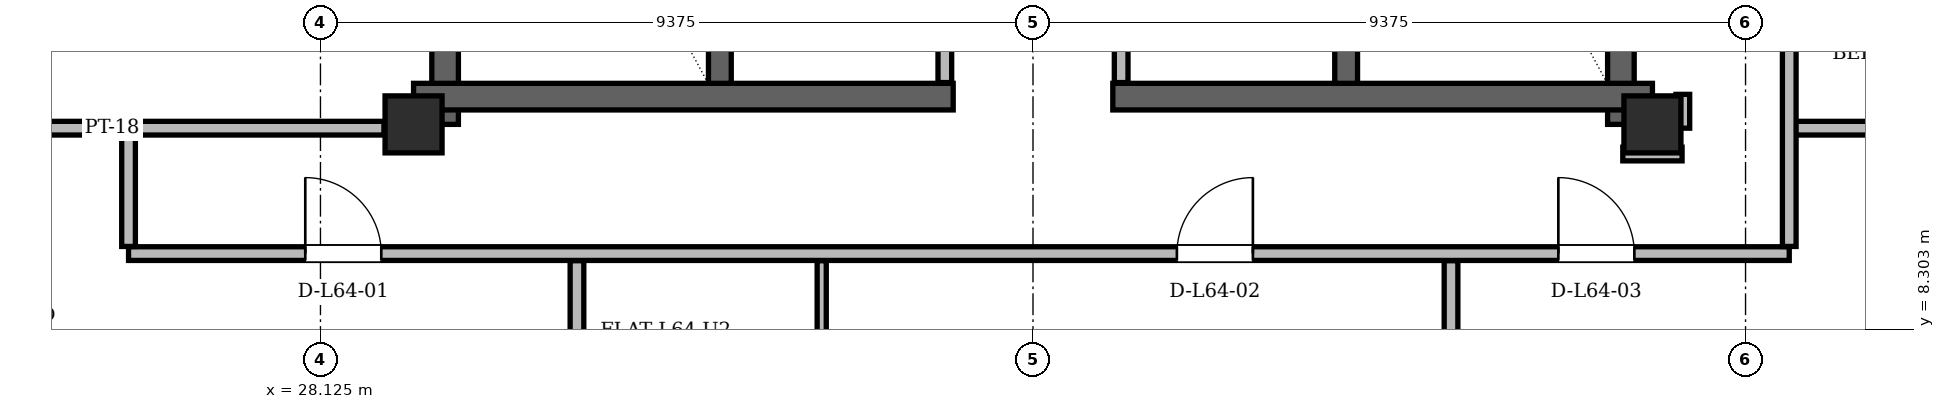
"""IFC4 building model, lengths in metres.
Left out: names, types, materials, properties, quantities, classifications, styles, units other than length and angle.
Written with IfcOpenShell. Run it as: python <this file> out.ifc"""

import sys

from ifc_helpers import new_model, si_unit, direction, frame, frame_2d, origin, origin_2d, place, context, subcontext, project, spatial, rectangle, hollow_rectangle, extrude, element, fill, save


model = new_model("IFC4")
c1 = context("Model", 3, precision=1e-05, world=origin(), true_north=direction((0.0, 1.0)))
c2 = subcontext(c1, "Body", "Model", "MODEL_VIEW")
j1 = project(units=[si_unit("LENGTHUNIT", "METRE"), si_unit("PLANEANGLEUNIT", "RADIAN")], contexts=[c1])
p1 = place(None, origin())
s1 = spatial("IfcSite", under=j1, at=p1, CompositionType="ELEMENT")
p2 = place(p1, origin())
s2 = spatial("IfcBuilding", under=s1, at=p2, CompositionType="ELEMENT")
p3 = place(p2, frame((0.0, 0.0, 241.5)))
s3 = spatial("IfcBuildingStorey", under=s2, at=p3, CompositionType="ELEMENT", Elevation=241.5)
for number, where, z_axis, x_axis in (
    (1, (29.35, 11.0, 0.0), (0.0, 0.0, 1.0), (1.0, 0.0, 0.0)),
    (2, (45.65, 11.0, 0.0), (0.0, 0.0, 1.0), (1.0, 0.0, 0.0)),
):
    element("IfcColumn", number, at=place(p3, frame(where, z_axis=z_axis, x_axis=x_axis)), inside=s3, PredefinedType="COLUMN", context=c2, shape_type="SweptSolid", body=[
        extrude(hollow_rectangle(XDim=0.75, YDim=0.75, WallThickness=0.06, at=origin_2d()), origin(), (0.0, 0.0, 1.0), 3.6),
    ])
for number, where, z_axis, x_axis in (
    (3, (29.765, 11.0, 0.0), (0.0, 0.0, 1.0), (0.0, 1.0, 0.0)),
    (4, (45.235, 11.0, 0.0), (0.0, 0.0, 1.0), (0.0, 1.0, 0.0)),
):
    element("IfcWall", number, at=place(p3, frame(where, z_axis=z_axis, x_axis=x_axis)), inside=s3, PredefinedType="SHEAR", context=c2, shape_type="SweptSolid", body=[
        extrude(rectangle(XDim=13.3, YDim=0.35, at=frame_2d((6.65, 0.0))), origin(), (0.0, 0.0, 1.0), 3.34),
    ])
for number, where, z_axis, x_axis in (
    (5, (29.35, 11.365, 0.0), (0.0, 0.0, 1.0), (1.0, 0.0, 0.0)),
    (6, (38.55, 11.365, 0.0), (0.0, 0.0, 1.0), (1.0, 0.0, 0.0)),
):
    element("IfcWall", number, at=place(p3, frame(where, z_axis=z_axis, x_axis=x_axis)), inside=s3, PredefinedType="SHEAR", context=c2, shape_type="SweptSolid", body=[
        extrude(rectangle(XDim=7.1, YDim=0.35, at=frame_2d((3.55, 0.0))), origin(), (0.0, 0.0, 1.0), 3.34),
    ])
for number, where, z_axis, x_axis in (
    (7, (33.38, 11.54, 0.0), (0.0, 0.0, 1.0), (0.0, 1.0, 0.0)),
    (8, (41.62, 11.54, 0.0), (0.0, 0.0, 1.0), (0.0, 1.0, 0.0)),
):
    element("IfcWall", number, at=place(p3, frame(where, z_axis=z_axis, x_axis=x_axis)), inside=s3, PredefinedType="SHEAR", context=c2, shape_type="SweptSolid", body=[
        extrude(rectangle(XDim=7.62, YDim=0.3, at=frame_2d((3.81, 0.0))), origin(), (0.0, 0.0, 1.0), 3.34),
    ])
p4 = place(p3, frame((58.857, 11.097, 0.0), z_axis=(0.0, 0.0, 1.0), x_axis=(-0.499999075663, 0.86602593745, 0.0)))
e9 = element("IfcWall", 9, at=p4, inside=s3, PredefinedType="SOLIDWALL", context=c2, shape_type="SweptSolid", body=[
    extrude(rectangle(XDim=36.951, YDim=0.29, at=frame_2d((18.476, 0.0))), origin(), (0.0, 0.0, 1.0), 2.637),
])
p5 = place(p4, frame((7.615, 0.0, 0.0)))
e10 = element("IfcOpeningElement", 10, at=p5, cuts=e9, PredefinedType="OPENING", context=c2, shape_type="SweptSolid", body=[
    extrude(rectangle(XDim=1.5, YDim=2.2, at=frame_2d((0.75, 1.1))), frame((0.0, 0.145, 0.0), z_axis=(0.0, -1.0, 0.0), x_axis=(1.0, 0.0, 0.0)), (0.0, 0.0, 1.0), 0.29),
])
p6 = place(p4, frame((28.662, 0.0, 0.0)))
e11 = element("IfcOpeningElement", 11, at=p6, cuts=e9, PredefinedType="OPENING", context=c2, shape_type="SweptSolid", body=[
    extrude(rectangle(XDim=1.5, YDim=2.2, at=frame_2d((0.75, 1.1))), frame((0.0, 0.145, 0.0), z_axis=(0.0, -1.0, 0.0), x_axis=(1.0, 0.0, 0.0)), (0.0, 0.0, 1.0), 0.29),
])
p7 = place(p4, frame((3.768, 0.0, 0.85)))
e12 = element("IfcOpeningElement", 12, at=p7, cuts=e9, PredefinedType="OPENING", context=c2, shape_type="SweptSolid", body=[
    extrude(rectangle(XDim=1.2, YDim=1.48, at=frame_2d((0.6, 0.74))), frame((0.0, 0.145, 0.0), z_axis=(0.0, -1.0, 0.0), x_axis=(1.0, 0.0, 0.0)), (0.0, 0.0, 1.0), 0.29),
])
p8 = place(p4, frame((1.122, 0.0, 0.85)))
e13 = element("IfcOpeningElement", 13, at=p8, cuts=e9, PredefinedType="OPENING", context=c2, shape_type="SweptSolid", body=[
    extrude(rectangle(XDim=1.6, YDim=1.677, at=frame_2d((0.8, 0.838))), frame((0.0, 0.145, 0.0), z_axis=(0.0, -1.0, 0.0), x_axis=(1.0, 0.0, 0.0)), (0.0, 0.0, 1.0), 0.29),
])
p9 = place(p4, frame((34.681, 0.0, 0.85)))
e14 = element("IfcOpeningElement", 14, at=p9, cuts=e9, PredefinedType="OPENING", context=c2, shape_type="SweptSolid", body=[
    extrude(rectangle(XDim=1.2, YDim=1.48, at=frame_2d((0.6, 0.74))), frame((0.0, 0.145, 0.0), z_axis=(0.0, -1.0, 0.0), x_axis=(1.0, 0.0, 0.0)), (0.0, 0.0, 1.0), 0.29),
])
p10 = place(p4, frame((16.81, 0.0, 0.85)))
e15 = element("IfcOpeningElement", 15, at=p10, cuts=e9, PredefinedType="OPENING", context=c2, shape_type="SweptSolid", body=[
    extrude(rectangle(XDim=2.2, YDim=1.677, at=frame_2d((1.1, 0.838))), frame((0.0, 0.145, 0.0), z_axis=(0.0, -1.0, 0.0), x_axis=(1.0, 0.0, 0.0)), (0.0, 0.0, 1.0), 0.29),
])
p11 = place(p4, frame((22.803, 0.0, 0.85)))
e16 = element("IfcOpeningElement", 16, at=p11, cuts=e9, PredefinedType="OPENING", context=c2, shape_type="SweptSolid", body=[
    extrude(rectangle(XDim=1.6, YDim=1.677, at=frame_2d((0.8, 0.838))), frame((0.0, 0.145, 0.0), z_axis=(0.0, -1.0, 0.0), x_axis=(1.0, 0.0, 0.0)), (0.0, 0.0, 1.0), 0.29),
])
p12 = place(p4, frame((9.478, 0.0, 0.85)))
e17 = element("IfcOpeningElement", 17, at=p12, cuts=e9, PredefinedType="OPENING", context=c2, shape_type="SweptSolid", body=[
    extrude(rectangle(XDim=1.2, YDim=1.48, at=frame_2d((0.6, 0.74))), frame((0.0, 0.145, 0.0), z_axis=(0.0, -1.0, 0.0), x_axis=(1.0, 0.0, 0.0)), (0.0, 0.0, 1.0), 0.29),
])
p13 = place(p3, frame((34.618, 43.098, 0.0), z_axis=(0.0, 0.0, 1.0), x_axis=(-0.499999075663, -0.86602593745, 0.0)))
e18 = element("IfcWall", 18, at=p13, inside=s3, PredefinedType="SOLIDWALL", context=c2, shape_type="SweptSolid", body=[
    extrude(rectangle(XDim=36.951, YDim=0.29, at=frame_2d((18.476, 0.0))), origin(), (0.0, 0.0, 1.0), 2.637),
])
p14 = place(p13, frame((8.244, 0.0, 0.0)))
e19 = element("IfcOpeningElement", 19, at=p14, cuts=e18, PredefinedType="OPENING", context=c2, shape_type="SweptSolid", body=[
    extrude(rectangle(XDim=1.5, YDim=2.2, at=frame_2d((0.75, 1.1))), frame((0.0, 0.145, 0.0), z_axis=(0.0, -1.0, 0.0), x_axis=(1.0, 0.0, 0.0)), (0.0, 0.0, 1.0), 0.29),
])
p15 = place(p13, frame((32.022, 0.0, 0.0)))
e20 = element("IfcOpeningElement", 20, at=p15, cuts=e18, PredefinedType="OPENING", context=c2, shape_type="SweptSolid", body=[
    extrude(rectangle(XDim=1.5, YDim=2.2, at=frame_2d((0.75, 1.1))), frame((0.0, 0.145, 0.0), z_axis=(0.0, -1.0, 0.0), x_axis=(1.0, 0.0, 0.0)), (0.0, 0.0, 1.0), 0.29),
])
p16 = place(p13, frame((21.911, 0.0, 0.85)))
e21 = element("IfcOpeningElement", 21, at=p16, cuts=e18, PredefinedType="OPENING", context=c2, shape_type="SweptSolid", body=[
    extrude(rectangle(XDim=2.4, YDim=1.677, at=frame_2d((1.2, 0.838))), frame((0.0, 0.145, 0.0), z_axis=(0.0, -1.0, 0.0), x_axis=(1.0, 0.0, 0.0)), (0.0, 0.0, 1.0), 0.29),
])
p17 = place(p13, frame((28.29, 0.0, 0.85)))
e22 = element("IfcOpeningElement", 22, at=p17, cuts=e18, PredefinedType="OPENING", context=c2, shape_type="SweptSolid", body=[
    extrude(rectangle(XDim=1.2, YDim=1.48, at=frame_2d((0.6, 0.74))), frame((0.0, 0.145, 0.0), z_axis=(0.0, -1.0, 0.0), x_axis=(1.0, 0.0, 0.0)), (0.0, 0.0, 1.0), 0.29),
])
p18 = place(p13, frame((34.755, 0.0, 0.85)))
e23 = element("IfcOpeningElement", 23, at=p18, cuts=e18, PredefinedType="OPENING", context=c2, shape_type="SweptSolid", body=[
    extrude(rectangle(XDim=1.2, YDim=1.48, at=frame_2d((0.6, 0.74))), frame((0.0, 0.145, 0.0), z_axis=(0.0, -1.0, 0.0), x_axis=(1.0, 0.0, 0.0)), (0.0, 0.0, 1.0), 0.29),
])
p19 = place(p13, frame((12.233, 0.0, 0.85)))
e24 = element("IfcOpeningElement", 24, at=p19, cuts=e18, PredefinedType="OPENING", context=c2, shape_type="SweptSolid", body=[
    extrude(rectangle(XDim=1.2, YDim=1.48, at=frame_2d((0.6, 0.74))), frame((0.0, 0.145, 0.0), z_axis=(0.0, -1.0, 0.0), x_axis=(1.0, 0.0, 0.0)), (0.0, 0.0, 1.0), 0.29),
])
p20 = place(p13, frame((16.59, 0.0, 0.85)))
e25 = element("IfcOpeningElement", 25, at=p20, cuts=e18, PredefinedType="OPENING", context=c2, shape_type="SweptSolid", body=[
    extrude(rectangle(XDim=2.0, YDim=1.677, at=frame_2d((1.0, 0.838))), frame((0.0, 0.145, 0.0), z_axis=(0.0, -1.0, 0.0), x_axis=(1.0, 0.0, 0.0)), (0.0, 0.0, 1.0), 0.29),
])
p21 = place(p13, frame((3.092, 0.0, 0.85)))
e26 = element("IfcOpeningElement", 26, at=p21, cuts=e18, PredefinedType="OPENING", context=c2, shape_type="SweptSolid", body=[
    extrude(rectangle(XDim=1.2, YDim=1.48, at=frame_2d((0.6, 0.74))), frame((0.0, 0.145, 0.0), z_axis=(0.0, -1.0, 0.0), x_axis=(1.0, 0.0, 0.0)), (0.0, 0.0, 1.0), 0.29),
])
p22 = place(p3, frame((36.34, 11.55, 0.0), z_axis=(0.0, 0.0, 1.0), x_axis=(0.0, 1.0, 0.0)))
e27 = element("IfcWall", 27, at=p22, inside=s3, PredefinedType="PARTITIONING", context=c2, shape_type="SweptSolid", body=[
    extrude(rectangle(XDim=5.55, YDim=0.18, at=frame_2d((2.775, 0.0))), origin(), (0.0, 0.0, 1.0), 3.34),
])
p23 = place(p22, frame((0.55, 0.0, 0.0)))
e28 = element("IfcOpeningElement", 28, at=p23, cuts=e27, PredefinedType="OPENING", context=c2, shape_type="SweptSolid", body=[
    extrude(rectangle(XDim=0.88, YDim=2.08, at=frame_2d((0.44, 1.04))), frame((0.0, 0.09, 0.0), z_axis=(0.0, -1.0, 0.0), x_axis=(1.0, 0.0, 0.0)), (0.0, 0.0, 1.0), 0.18),
])
p24 = place(p22, frame((3.25, 0.0, 0.0)))
e29 = element("IfcOpeningElement", 29, at=p24, cuts=e27, PredefinedType="OPENING", context=c2, shape_type="SweptSolid", body=[
    extrude(rectangle(XDim=0.88, YDim=2.08, at=frame_2d((0.44, 1.04))), frame((0.0, 0.09, 0.0), z_axis=(0.0, -1.0, 0.0), x_axis=(1.0, 0.0, 0.0)), (0.0, 0.0, 1.0), 0.18),
])
p25 = place(p3, frame((38.66, 11.55, 0.0), z_axis=(0.0, 0.0, 1.0), x_axis=(0.0, 1.0, 0.0)))
e30 = element("IfcWall", 30, at=p25, inside=s3, PredefinedType="PARTITIONING", context=c2, shape_type="SweptSolid", body=[
    extrude(rectangle(XDim=5.55, YDim=0.18, at=frame_2d((2.775, 0.0))), origin(), (0.0, 0.0, 1.0), 3.34),
])
p26 = place(p25, frame((1.35, 0.0, 0.0)))
e31 = element("IfcOpeningElement", 31, at=p26, cuts=e30, PredefinedType="OPENING", context=c2, shape_type="SweptSolid", body=[
    extrude(rectangle(XDim=0.88, YDim=2.08, at=frame_2d((0.44, 1.04))), frame((0.0, 0.09, 0.0), z_axis=(0.0, -1.0, 0.0), x_axis=(1.0, 0.0, 0.0)), (0.0, 0.0, 1.0), 0.18),
])
p27 = place(p25, frame((4.1, 0.0, 0.0)))
e32 = element("IfcOpeningElement", 32, at=p27, cuts=e30, PredefinedType="OPENING", context=c2, shape_type="SweptSolid", body=[
    extrude(rectangle(XDim=0.88, YDim=2.08, at=frame_2d((0.44, 1.04))), frame((0.0, 0.09, 0.0), z_axis=(0.0, -1.0, 0.0), x_axis=(1.0, 0.0, 0.0)), (0.0, 0.0, 1.0), 0.18),
])
p28 = place(p3, frame((25.6, 9.3, 0.0), z_axis=(0.0, 0.0, 1.0), x_axis=(1.0, 0.0, 0.0)))
e33 = element("IfcWall", 33, at=p28, inside=s3, PredefinedType="PARTITIONING", context=c2, shape_type="SweptSolid", body=[
    extrude(rectangle(XDim=21.85, YDim=0.18, at=frame_2d((10.925, 0.0))), origin(), (0.0, 0.0, 1.0), 2.873),
])
p29 = place(p28, frame((2.325, 0.0, 0.0)))
e34 = element("IfcOpeningElement", 34, at=p29, cuts=e33, PredefinedType="OPENING", context=c2, shape_type="SweptSolid", body=[
    extrude(rectangle(XDim=1.0, YDim=2.18, at=frame_2d((0.5, 1.09))), frame((0.0, 0.09, 0.0), z_axis=(0.0, -1.0, 0.0), x_axis=(1.0, 0.0, 0.0)), (0.0, 0.0, 1.0), 0.18),
])
p30 = place(p28, frame((13.793, 0.0, 0.0)))
e35 = element("IfcOpeningElement", 35, at=p30, cuts=e33, PredefinedType="OPENING", context=c2, shape_type="SweptSolid", body=[
    extrude(rectangle(XDim=1.0, YDim=2.18, at=frame_2d((0.5, 1.09))), frame((0.0, 0.09, 0.0), z_axis=(0.0, -1.0, 0.0), x_axis=(1.0, 0.0, 0.0)), (0.0, 0.0, 1.0), 0.18),
])
p31 = place(p28, frame((18.812, 0.0, 0.0)))
e36 = element("IfcOpeningElement", 36, at=p31, cuts=e33, PredefinedType="OPENING", context=c2, shape_type="SweptSolid", body=[
    extrude(rectangle(XDim=1.0, YDim=2.18, at=frame_2d((0.5, 1.09))), frame((0.0, 0.09, 0.0), z_axis=(0.0, -1.0, 0.0), x_axis=(1.0, 0.0, 0.0)), (0.0, 0.0, 1.0), 0.18),
])
p32 = place(p3, frame((45.26, 10.61, 0.0), z_axis=(0.0, 0.0, 1.0), x_axis=(1.0, 0.0, 0.0)))
e37 = element("IfcWall", 37, at=p32, inside=s3, PredefinedType="PARTITIONING", context=c2, shape_type="SweptSolid", body=[
    extrude(rectangle(XDim=0.78, YDim=0.18, at=frame_2d((0.39, 0.0))), origin(), (0.0, 0.0, 1.0), 3.34),
])
p33 = place(p3, frame((16.528, 10.95, 0.0), z_axis=(0.0, 0.0, 1.0), x_axis=(1.0, 0.0, 0.0)))
e38 = element("IfcWall", 38, at=p33, inside=s3, PredefinedType="PARTITIONING", context=c2, shape_type="SweptSolid", body=[
    extrude(rectangle(XDim=12.432, YDim=0.18, at=frame_2d((6.216, 0.0))), origin(), (0.0, 0.0, 1.0), 2.873),
])
p34 = place(p3, frame((47.45, 10.95, 0.0), z_axis=(0.0, 0.0, 1.0), x_axis=(1.0, 0.0, 0.0)))
e39 = element("IfcWall", 39, at=p34, inside=s3, PredefinedType="PARTITIONING", context=c2, shape_type="SweptSolid", body=[
    extrude(rectangle(XDim=11.022, YDim=0.18, at=frame_2d((5.511, 0.0))), origin(), (0.0, 0.0, 1.0), 2.873),
])
p35 = place(p3, frame((25.6, 9.394, 0.0), z_axis=(0.0, 0.0, 1.0), x_axis=(0.0, 1.0, 0.0)))
e40 = element("IfcWall", 40, at=p35, inside=s3, PredefinedType="PARTITIONING", context=c2, shape_type="SweptSolid", body=[
    extrude(rectangle(XDim=1.462, YDim=0.18, at=frame_2d((0.731, 0.0))), origin(), (0.0, 0.0, 1.0), 3.34),
])
p36 = place(p3, frame((31.5, 6.254, 0.0), z_axis=(0.0, 0.0, 1.0), x_axis=(0.0, 1.0, 0.0)))
e41 = element("IfcWall", 41, at=p36, inside=s3, PredefinedType="PARTITIONING", context=c2, shape_type="SweptSolid", body=[
    extrude(rectangle(XDim=2.952, YDim=0.18, at=frame_2d((1.476, 0.0))), origin(), (0.0, 0.0, 1.0), 2.926),
])
p37 = place(p3, frame((34.72, 6.254, 0.0), z_axis=(0.0, 0.0, 1.0), x_axis=(0.0, 1.0, 0.0)))
e42 = element("IfcWall", 42, at=p37, inside=s3, PredefinedType="PARTITIONING", context=c2, shape_type="SweptSolid", body=[
    extrude(rectangle(XDim=2.952, YDim=0.12, at=frame_2d((1.476, 0.0))), origin(), (0.0, 0.0, 1.0), 3.34),
])
p38 = place(p37, frame((1.083, 0.0, 0.0)))
e43 = element("IfcOpeningElement", 43, at=p38, cuts=e42, PredefinedType="OPENING", context=c2, shape_type="SweptSolid", body=[
    extrude(rectangle(XDim=0.88, YDim=2.08, at=frame_2d((0.44, 1.04))), frame((0.0, 0.06, 0.0), z_axis=(0.0, -1.0, 0.0), x_axis=(1.0, 0.0, 0.0)), (0.0, 0.0, 1.0), 0.12),
])
p39 = place(p3, frame((43.0, 6.254, 0.0), z_axis=(0.0, 0.0, 1.0), x_axis=(0.0, 1.0, 0.0)))
e44 = element("IfcWall", 44, at=p39, inside=s3, PredefinedType="PARTITIONING", context=c2, shape_type="SweptSolid", body=[
    extrude(rectangle(XDim=2.952, YDim=0.18, at=frame_2d((1.476, 0.0))), origin(), (0.0, 0.0, 1.0), 3.34),
])
p40 = place(p3, frame((46.05, 10.95, 0.0), z_axis=(0.0, 0.0, 1.0), x_axis=(0.0, 1.0, 0.0)))
e45 = element("IfcWall", 45, at=p40, inside=s3, PredefinedType="PARTITIONING", context=c2, shape_type="SweptSolid", body=[
    extrude(rectangle(XDim=0.445, YDim=0.18, at=frame_2d((0.223, 0.0))), origin(), (0.0, 0.0, 1.0), 2.873),
])
p41 = place(p3, frame((47.45, 9.394, 0.0), z_axis=(0.0, 0.0, 1.0), x_axis=(0.0, 1.0, 0.0)))
e46 = element("IfcWall", 46, at=p41, inside=s3, PredefinedType="PARTITIONING", context=c2, shape_type="SweptSolid", body=[
    extrude(rectangle(XDim=16.482, YDim=0.18, at=frame_2d((8.241, 0.0))), origin(), (0.0, 0.0, 1.0), 2.873),
])
p42 = place(p41, frame((6.247, 0.0, 0.0)))
e47 = element("IfcOpeningElement", 47, at=p42, cuts=e46, PredefinedType="OPENING", context=c2, shape_type="SweptSolid", body=[
    extrude(rectangle(XDim=1.0, YDim=2.18, at=frame_2d((0.5, 1.09))), frame((0.0, 0.09, 0.0), z_axis=(0.0, -1.0, 0.0), x_axis=(1.0, 0.0, 0.0)), (0.0, 0.0, 1.0), 0.18),
])
p43 = place(p41, frame((10.379, 0.0, 0.0)))
e48 = element("IfcOpeningElement", 48, at=p43, cuts=e46, PredefinedType="OPENING", context=c2, shape_type="SweptSolid", body=[
    extrude(rectangle(XDim=1.0, YDim=2.18, at=frame_2d((0.5, 1.09))), frame((0.0, 0.09, 0.0), z_axis=(0.0, -1.0, 0.0), x_axis=(1.0, 0.0, 0.0)), (0.0, 0.0, 1.0), 0.18),
])
p44 = place(p29, origin())
e49 = element("IfcDoor", 49, at=p44, inside=s3, OperationType="SINGLE_SWING_LEFT", PredefinedType="DOOR", context=c2, shape_type="SweptSolid", body=[
    extrude(rectangle(XDim=1.0, YDim=2.18, at=frame_2d((0.5, 1.09))), frame((0.0, 0.025, 0.0), z_axis=(0.0, -1.0, 0.0), x_axis=(1.0, 0.0, 0.0)), (0.0, 0.0, 1.0), 0.05),
])
fill(e34, e49)
p45 = place(p30, origin())
e50 = element("IfcDoor", 50, at=p45, inside=s3, OperationType="SINGLE_SWING_RIGHT", PredefinedType="DOOR", context=c2, shape_type="SweptSolid", body=[
    extrude(rectangle(XDim=1.0, YDim=2.18, at=frame_2d((0.5, 1.09))), frame((0.0, 0.025, 0.0), z_axis=(0.0, -1.0, 0.0), x_axis=(1.0, 0.0, 0.0)), (0.0, 0.0, 1.0), 0.05),
])
fill(e35, e50)
p46 = place(p31, origin())
e51 = element("IfcDoor", 51, at=p46, inside=s3, OperationType="SINGLE_SWING_LEFT", PredefinedType="DOOR", context=c2, shape_type="SweptSolid", body=[
    extrude(rectangle(XDim=1.0, YDim=2.18, at=frame_2d((0.5, 1.09))), frame((0.0, 0.025, 0.0), z_axis=(0.0, -1.0, 0.0), x_axis=(1.0, 0.0, 0.0)), (0.0, 0.0, 1.0), 0.05),
])
fill(e36, e51)
save(model, sys.argv[1])
